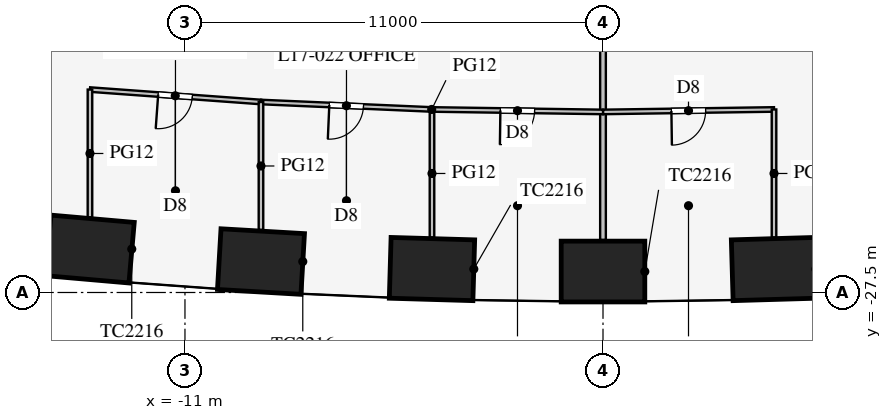
"""IFC4 building model, lengths in metres.
Left out: names, types, materials, properties, quantities, classifications, styles, units other than length and angle.
Written with IfcOpenShell. Run it as: python <this file> out.ifc"""

import sys

from ifc_helpers import new_model, si_unit, direction, frame, frame_2d, origin, origin_2d, place, context, subcontext, project, spatial, rectangle, extrude, element, fill, save


model = new_model("IFC4")
c1 = context("Model", 3, precision=1e-05, world=origin(), true_north=direction((0.0, 1.0)))
c2 = subcontext(c1, "Body", "Model", "MODEL_VIEW")
j1 = project(units=[si_unit("LENGTHUNIT", "METRE"), si_unit("PLANEANGLEUNIT", "RADIAN")], contexts=[c1])
p1 = place(None, origin())
s1 = spatial("IfcSite", under=j1, at=p1, CompositionType="ELEMENT")
p2 = place(p1, origin())
s2 = spatial("IfcBuilding", under=s1, at=p2, CompositionType="ELEMENT")
p3 = place(p2, frame((0.0, 0.0, 75.3)))
s3 = spatial("IfcBuildingStorey", under=s2, at=p3, CompositionType="ELEMENT", Elevation=75.3)
for number, where, z_axis, x_axis in (
    (1, (-13.5, -26.357, 0.0), (0.0, 0.0, 1.0), (0.996, -0.087, 0.0)),
    (2, (-9.0, -26.686, 0.0), (0.0, 0.0, 1.0), (0.998, -0.058, 0.0)),
    (3, (-4.5, -26.883, 0.0), (0.0, 0.0, 1.0), (1.0, -0.029, 0.0)),
    (4, (0.0, -26.949, 0.0), (0.0, 0.0, 1.0), (1.0, 0.0, 0.0)),
    (5, (4.5, -26.883, 0.0), (0.0, 0.0, 1.0), (1.0, 0.029, 0.0)),
):
    element("IfcColumn", number, at=place(p3, frame(where, z_axis=z_axis, x_axis=x_axis)), inside=s3, PredefinedType="COLUMN", context=c2, shape_type="SweptSolid", body=[
        extrude(rectangle(XDim=2.2, YDim=1.6, at=origin_2d()), origin(), (0.0, 0.0, 1.0), 4.2),
    ])
p4 = place(p3, frame((0.0, -13.41, 0.0), z_axis=(0.0, 0.0, 1.0), x_axis=(0.0, -1.0, 0.0)))
e6 = element("IfcWall", 6, at=p4, inside=s3, PredefinedType="PARTITIONING", context=c2, shape_type="SweptSolid", body=[
    extrude(rectangle(XDim=12.709, YDim=0.15, at=frame_2d((6.354, 0.0))), origin(), (0.0, 0.0, 1.0), 2.8),
])
p5 = place(p3, frame((0.0, -22.749, 0.0), z_axis=(0.0, 0.0, 1.0), x_axis=(0.999894311967, 0.014538393859, 0.0)))
e7 = element("IfcWall", 7, at=p5, inside=s3, PredefinedType="PARTITIONING", context=c2, shape_type="SweptSolid", body=[
    extrude(rectangle(XDim=4.5, YDim=0.12, at=frame_2d((2.25, 0.0))), origin(), (0.0, 0.0, 1.0), 2.9),
])
p6 = place(p5, frame((1.8, 0.0, 0.15)))
e8 = element("IfcOpeningElement", 8, at=p6, cuts=e7, PredefinedType="OPENING", context=c2, shape_type="SweptSolid", body=[
    extrude(rectangle(XDim=0.9, YDim=2.1, at=frame_2d((0.45, 1.05))), frame((0.0, 0.07, 0.0), z_axis=(0.0, -1.0, 0.0), x_axis=(1.0, 0.0, 0.0)), (0.0, 0.0, 1.0), 0.14),
])
p7 = place(p3, frame((-13.5, -22.16, 0.0), z_axis=(0.0, 0.0, 1.0), x_axis=(0.997363894896, -0.072562119306, 0.0)))
e9 = element("IfcWall", 9, at=p7, inside=s3, PredefinedType="PARTITIONING", context=c2, shape_type="SweptSolid", body=[
    extrude(rectangle(XDim=4.512, YDim=0.12, at=frame_2d((2.256, 0.0))), origin(), (0.0, 0.0, 1.0), 2.9),
])
p8 = place(p7, frame((1.8, 0.0, 0.15)))
e10 = element("IfcOpeningElement", 10, at=p8, cuts=e9, PredefinedType="OPENING", context=c2, shape_type="SweptSolid", body=[
    extrude(rectangle(XDim=0.9, YDim=2.1, at=frame_2d((0.45, 1.05))), frame((0.0, 0.07, 0.0), z_axis=(0.0, -1.0, 0.0), x_axis=(1.0, 0.0, 0.0)), (0.0, 0.0, 1.0), 0.14),
])
p9 = place(p3, frame((-4.5, -22.683, 0.0), z_axis=(0.0, 0.0, 1.0), x_axis=(0.999894311967, -0.014538393859, 0.0)))
e11 = element("IfcWall", 11, at=p9, inside=s3, PredefinedType="PARTITIONING", context=c2, shape_type="SweptSolid", body=[
    extrude(rectangle(XDim=4.5, YDim=0.12, at=frame_2d((2.25, 0.0))), origin(), (0.0, 0.0, 1.0), 2.9),
])
p10 = place(p9, frame((1.8, 0.0, 0.15)))
e12 = element("IfcOpeningElement", 12, at=p10, cuts=e11, PredefinedType="OPENING", context=c2, shape_type="SweptSolid", body=[
    extrude(rectangle(XDim=0.9, YDim=2.1, at=frame_2d((0.45, 1.05))), frame((0.0, 0.07, 0.0), z_axis=(0.0, -1.0, 0.0), x_axis=(1.0, 0.0, 0.0)), (0.0, 0.0, 1.0), 0.14),
])
p11 = place(p3, frame((-9.0, -22.487, 0.0), z_axis=(0.0, 0.0, 1.0), x_axis=(0.999052370647, -0.043524254212, 0.0)))
e13 = element("IfcWall", 13, at=p11, inside=s3, PredefinedType="PARTITIONING", context=c2, shape_type="SweptSolid", body=[
    extrude(rectangle(XDim=4.504, YDim=0.12, at=frame_2d((2.252, 0.0))), origin(), (0.0, 0.0, 1.0), 2.9),
])
p12 = place(p11, frame((1.8, 0.0, 0.15)))
e14 = element("IfcOpeningElement", 14, at=p12, cuts=e13, PredefinedType="OPENING", context=c2, shape_type="SweptSolid", body=[
    extrude(rectangle(XDim=0.9, YDim=2.1, at=frame_2d((0.45, 1.05))), frame((0.0, 0.07, 0.0), z_axis=(0.0, -1.0, 0.0), x_axis=(1.0, 0.0, 0.0)), (0.0, 0.0, 1.0), 0.14),
])
p13 = place(p3, frame((4.5, -22.683, 0.0), z_axis=(0.0, 0.0, 1.0), x_axis=(0.0, -1.0, 0.0)))
e15 = element("IfcWall", 15, at=p13, inside=s3, PredefinedType="PARTITIONING", context=c2, shape_type="SweptSolid", body=[
    extrude(rectangle(XDim=3.369, YDim=0.12, at=frame_2d((1.685, 0.0))), origin(), (0.0, 0.0, 1.0), 2.8),
])
p14 = place(p3, frame((-13.5, -22.16, 0.0), z_axis=(0.0, 0.0, 1.0), x_axis=(0.0, -1.0, 0.0)))
e16 = element("IfcWall", 16, at=p14, inside=s3, PredefinedType="PARTITIONING", context=c2, shape_type="SweptSolid", body=[
    extrude(rectangle(XDim=3.364, YDim=0.12, at=frame_2d((1.682, 0.0))), origin(), (0.0, 0.0, 1.0), 2.6),
])
p15 = place(p3, frame((-4.5, -22.683, 0.0), z_axis=(0.0, 0.0, 1.0), x_axis=(0.0, -1.0, 0.0)))
e17 = element("IfcWall", 17, at=p15, inside=s3, PredefinedType="PARTITIONING", context=c2, shape_type="SweptSolid", body=[
    extrude(rectangle(XDim=3.369, YDim=0.12, at=frame_2d((1.685, 0.0))), origin(), (0.0, 0.0, 1.0), 2.8),
])
p16 = place(p3, frame((-9.0, -22.487, 0.0), z_axis=(0.0, 0.0, 1.0), x_axis=(0.0, -1.0, 0.0)))
e18 = element("IfcWall", 18, at=p16, inside=s3, PredefinedType="PARTITIONING", context=c2, shape_type="SweptSolid", body=[
    extrude(rectangle(XDim=3.367, YDim=0.12, at=frame_2d((1.684, 0.0))), origin(), (0.0, 0.0, 1.0), 2.8),
])
p17 = place(p8, frame((0.9, 0.0, 0.0), z_axis=(0.0, 0.0, 1.0), x_axis=(-1.0, 0.0, 0.0)))
e19 = element("IfcDoor", 19, at=p17, inside=s3, OperationType="SINGLE_SWING_RIGHT", PredefinedType="DOOR", context=c2, shape_type="SweptSolid", body=[
    extrude(rectangle(XDim=0.9, YDim=2.1, at=frame_2d((0.45, 1.05))), frame((0.0, 0.025, 0.0), z_axis=(0.0, -1.0, 0.0), x_axis=(1.0, 0.0, 0.0)), (0.0, 0.0, 1.0), 0.05),
])
fill(e10, e19)
p18 = place(p12, frame((0.9, 0.0, 0.0), z_axis=(0.0, 0.0, 1.0), x_axis=(-1.0, 0.0, 0.0)))
e20 = element("IfcDoor", 20, at=p18, inside=s3, OperationType="SINGLE_SWING_RIGHT", PredefinedType="DOOR", context=c2, shape_type="SweptSolid", body=[
    extrude(rectangle(XDim=0.9, YDim=2.1, at=frame_2d((0.45, 1.05))), frame((0.0, 0.025, 0.0), z_axis=(0.0, -1.0, 0.0), x_axis=(1.0, 0.0, 0.0)), (0.0, 0.0, 1.0), 0.05),
])
fill(e14, e20)
p19 = place(p10, frame((0.9, 0.0, 0.0), z_axis=(0.0, 0.0, 1.0), x_axis=(-1.0, 0.0, 0.0)))
e21 = element("IfcDoor", 21, at=p19, inside=s3, OperationType="SINGLE_SWING_RIGHT", PredefinedType="DOOR", context=c2, shape_type="SweptSolid", body=[
    extrude(rectangle(XDim=0.9, YDim=2.1, at=frame_2d((0.45, 1.05))), frame((0.0, 0.025, 0.0), z_axis=(0.0, -1.0, 0.0), x_axis=(1.0, 0.0, 0.0)), (0.0, 0.0, 1.0), 0.05),
])
fill(e12, e21)
p20 = place(p6, frame((0.9, 0.0, 0.0), z_axis=(0.0, 0.0, 1.0), x_axis=(-1.0, 0.0, 0.0)))
e22 = element("IfcDoor", 22, at=p20, inside=s3, OperationType="SINGLE_SWING_RIGHT", PredefinedType="DOOR", context=c2, shape_type="SweptSolid", body=[
    extrude(rectangle(XDim=0.9, YDim=2.1, at=frame_2d((0.45, 1.05))), frame((0.0, 0.025, 0.0), z_axis=(0.0, -1.0, 0.0), x_axis=(1.0, 0.0, 0.0)), (0.0, 0.0, 1.0), 0.05),
])
fill(e8, e22)
save(model, sys.argv[1])
